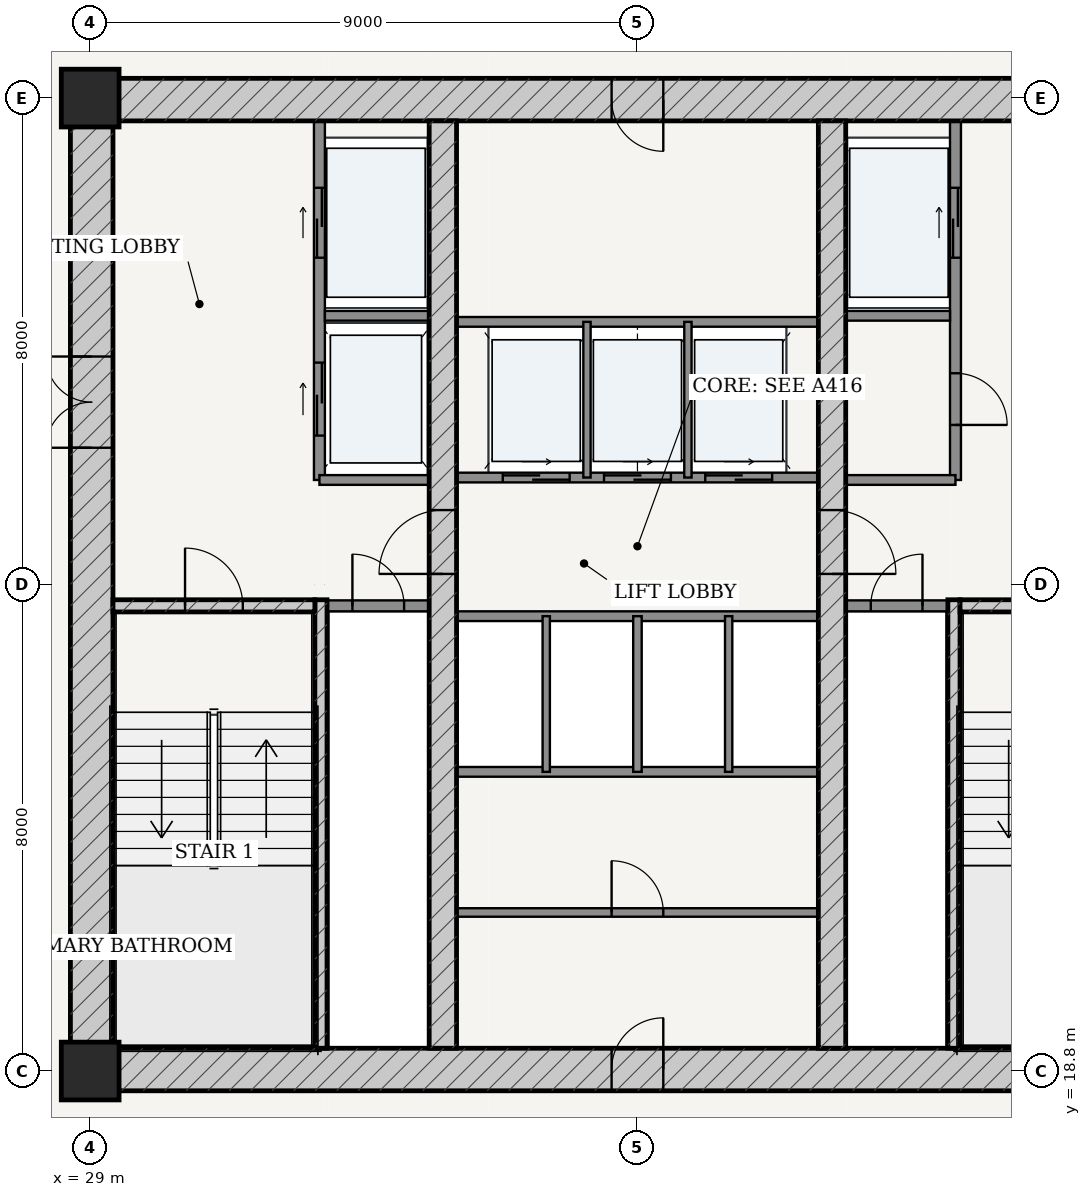
"""IFC4 building model, lengths in metres.
Left out: names, types, materials, properties, quantities, classifications, styles, units other than length and angle.
Written with IfcOpenShell. Run it as: python <this file> out.ifc"""

import sys

from ifc_helpers import new_model, si_unit, direction, frame, frame_2d, origin, origin_2d, place, context, subcontext, project, spatial, rectangle, extrude, source, transform, mapped, element, fill, save


model = new_model("IFC4")
c1 = context("Model", 3, precision=1e-05, world=origin(), true_north=direction((-0.2419218956, 0.970295726276)))
c2 = subcontext(c1, "Body", "Model", "MODEL_VIEW")
j1 = project(units=[si_unit("LENGTHUNIT", "METRE"), si_unit("PLANEANGLEUNIT", "RADIAN")], contexts=[c1])
p1 = place(None, origin())
s1 = spatial("IfcSite", under=j1, at=p1, CompositionType="ELEMENT")
p2 = place(p1, origin())
s2 = spatial("IfcBuilding", under=s1, at=p2, CompositionType="ELEMENT")
p3 = place(p2, frame((0.0, 0.0, 90.6)))
s3 = spatial("IfcBuildingStorey", under=s2, at=p3, CompositionType="ELEMENT", Elevation=90.6)
for number, where, z_axis, x_axis in (
    (1, (29.0, 18.8, 0.0), (0.0, 0.0, 1.0), (1.0, 0.0, 0.0)),
    (2, (29.0, 34.8, 0.0), (0.0, 0.0, 1.0), (1.0, 0.0, 0.0)),
):
    element("IfcColumn", number, at=place(p3, frame(where, z_axis=z_axis, x_axis=x_axis)), inside=s3, PredefinedType="COLUMN", context=c2, shape_type="SweptSolid", body=[
        extrude(rectangle(XDim=0.95, YDim=0.95, at=origin_2d()), origin(), (0.0, 0.0, 1.0), 3.6),
    ])
p4 = place(p3, frame((28.675, 18.825, 0.0), z_axis=(0.0, 0.0, 1.0), x_axis=(1.0, 0.0, 0.0)))
e3 = element("IfcWall", 3, at=p4, inside=s3, PredefinedType="SHEAR", context=c2, shape_type="SweptSolid", body=[
    extrude(rectangle(XDim=18.65, YDim=0.7, at=frame_2d((9.325, 0.0))), origin(), (0.0, 0.0, 1.0), 3.325),
])
p5 = place(p4, frame((8.9, 0.0, 0.0)))
e4 = element("IfcOpeningElement", 4, at=p5, cuts=e3, PredefinedType="OPENING", context=c2, shape_type="SweptSolid", body=[
    extrude(rectangle(XDim=0.85, YDim=2.1, at=frame_2d((0.425, 1.05))), frame((0.0, 0.36, 0.0), z_axis=(0.0, -1.0, 0.0), x_axis=(1.0, 0.0, 0.0)), (0.0, 0.0, 1.0), 0.72),
])
p6 = place(p3, frame((28.675, 34.775, 0.0), z_axis=(0.0, 0.0, 1.0), x_axis=(1.0, 0.0, 0.0)))
e5 = element("IfcWall", 5, at=p6, inside=s3, PredefinedType="SHEAR", context=c2, shape_type="SweptSolid", body=[
    extrude(rectangle(XDim=18.65, YDim=0.7, at=frame_2d((9.325, 0.0))), origin(), (0.0, 0.0, 1.0), 3.325),
])
p7 = place(p6, frame((8.9, 0.0, 0.0)))
e6 = element("IfcOpeningElement", 6, at=p7, cuts=e5, PredefinedType="OPENING", context=c2, shape_type="SweptSolid", body=[
    extrude(rectangle(XDim=0.85, YDim=2.1, at=frame_2d((0.425, 1.05))), frame((0.0, 0.36, 0.0), z_axis=(0.0, -1.0, 0.0), x_axis=(1.0, 0.0, 0.0)), (0.0, 0.0, 1.0), 0.72),
])
p8 = place(p3, frame((29.025, 19.175, 0.0), z_axis=(0.0, 0.0, 1.0), x_axis=(0.0, 1.0, 0.0)))
e7 = element("IfcWall", 7, at=p8, inside=s3, PredefinedType="SHEAR", context=c2, shape_type="SweptSolid", body=[
    extrude(rectangle(XDim=15.25, YDim=0.7, at=frame_2d((7.625, 0.0))), origin(), (0.0, 0.0, 1.0), 3.325),
])
p9 = place(p8, frame((9.875, 0.0, 0.0)))
e8 = element("IfcOpeningElement", 8, at=p9, cuts=e7, PredefinedType="OPENING", context=c2, shape_type="SweptSolid", body=[
    extrude(rectangle(XDim=1.5, YDim=2.2, at=frame_2d((0.75, 1.1))), frame((0.0, 0.36, 0.0), z_axis=(0.0, -1.0, 0.0), x_axis=(1.0, 0.0, 0.0)), (0.0, 0.0, 1.0), 0.72),
])
p10 = place(p3, frame((32.795, 19.175, 0.0), z_axis=(0.0, 0.0, 1.0), x_axis=(0.0, 1.0, 0.0)))
e9 = element("IfcWall", 9, at=p10, inside=s3, PredefinedType="SOLIDWALL", context=c2, shape_type="SweptSolid", body=[
    extrude(rectangle(XDim=7.375, YDim=0.2, at=frame_2d((3.688, 0.0))), origin(), (0.0, 0.0, 1.0), 3.325),
])
p11 = place(p3, frame((29.375, 26.45, 0.0), z_axis=(0.0, 0.0, 1.0), x_axis=(1.0, 0.0, 0.0)))
e10 = element("IfcWall", 10, at=p11, inside=s3, PredefinedType="SOLIDWALL", context=c2, shape_type="SweptSolid", body=[
    extrude(rectangle(XDim=3.32, YDim=0.2, at=frame_2d((1.66, 0.0))), origin(), (0.0, 0.0, 1.0), 3.325),
])
p12 = place(p11, frame((1.185, 0.0, 0.0)))
e11 = element("IfcOpeningElement", 11, at=p12, cuts=e10, PredefinedType="OPENING", context=c2, shape_type="SweptSolid", body=[
    extrude(rectangle(XDim=0.95, YDim=2.15, at=frame_2d((0.475, 1.075))), frame((0.0, 0.11, 0.0), z_axis=(0.0, -1.0, 0.0), x_axis=(1.0, 0.0, 0.0)), (0.0, 0.0, 1.0), 0.22),
])
p13 = place(p3, frame((43.205, 19.175, 0.0), z_axis=(0.0, 0.0, 1.0), x_axis=(0.0, 1.0, 0.0)))
e12 = element("IfcWall", 12, at=p13, inside=s3, PredefinedType="SOLIDWALL", context=c2, shape_type="SweptSolid", body=[
    extrude(rectangle(XDim=7.375, YDim=0.2, at=frame_2d((3.688, 0.0))), origin(), (0.0, 0.0, 1.0), 3.325),
])
p14 = place(p3, frame((43.305, 26.45, 0.0), z_axis=(0.0, 0.0, 1.0), x_axis=(1.0, 0.0, 0.0)))
e13 = element("IfcWall", 13, at=p14, inside=s3, PredefinedType="SOLIDWALL", context=c2, shape_type="SweptSolid", body=[
    extrude(rectangle(XDim=3.32, YDim=0.2, at=frame_2d((1.66, 0.0))), origin(), (0.0, 0.0, 1.0), 3.325),
])
p15 = place(p14, frame((1.185, 0.0, 0.0)))
e14 = element("IfcOpeningElement", 14, at=p15, cuts=e13, PredefinedType="OPENING", context=c2, shape_type="SweptSolid", body=[
    extrude(rectangle(XDim=0.95, YDim=2.15, at=frame_2d((0.475, 1.075))), frame((0.0, 0.11, 0.0), z_axis=(0.0, -1.0, 0.0), x_axis=(1.0, 0.0, 0.0)), (0.0, 0.0, 1.0), 0.22),
])
p16 = place(p3, frame((34.8, 19.175, 0.0), z_axis=(0.0, 0.0, 1.0), x_axis=(0.0, 1.0, 0.0)))
e15 = element("IfcWall", 15, at=p16, inside=s3, PredefinedType="SHEAR", context=c2, shape_type="SweptSolid", body=[
    extrude(rectangle(XDim=15.25, YDim=0.45, at=frame_2d((7.625, 0.0))), origin(), (0.0, 0.0, 1.0), 3.325),
])
p17 = place(p16, frame((7.8, 0.0, 0.0)))
e16 = element("IfcOpeningElement", 16, at=p17, cuts=e15, PredefinedType="OPENING", context=c2, shape_type="SweptSolid", body=[
    extrude(rectangle(XDim=1.05, YDim=2.15, at=frame_2d((0.525, 1.075))), frame((0.0, 0.235, 0.0), z_axis=(0.0, -1.0, 0.0), x_axis=(1.0, 0.0, 0.0)), (0.0, 0.0, 1.0), 0.47),
])
p18 = place(p3, frame((41.2, 19.175, 0.0), z_axis=(0.0, 0.0, 1.0), x_axis=(0.0, 1.0, 0.0)))
e17 = element("IfcWall", 17, at=p18, inside=s3, PredefinedType="SHEAR", context=c2, shape_type="SweptSolid", body=[
    extrude(rectangle(XDim=15.25, YDim=0.45, at=frame_2d((7.625, 0.0))), origin(), (0.0, 0.0, 1.0), 3.325),
])
p19 = place(p18, frame((7.8, 0.0, 0.0)))
e18 = element("IfcOpeningElement", 18, at=p19, cuts=e17, PredefinedType="OPENING", context=c2, shape_type="SweptSolid", body=[
    extrude(rectangle(XDim=1.05, YDim=2.15, at=frame_2d((0.525, 1.075))), frame((0.0, 0.235, 0.0), z_axis=(0.0, -1.0, 0.0), x_axis=(1.0, 0.0, 0.0)), (0.0, 0.0, 1.0), 0.47),
])
p20 = place(p3, frame((32.9, 26.45, 0.0), z_axis=(0.0, 0.0, 1.0), x_axis=(1.0, 0.0, 0.0)))
e19 = element("IfcWall", 19, at=p20, inside=s3, PredefinedType="PARTITIONING", context=c2, shape_type="SweptSolid", body=[
    extrude(rectangle(XDim=1.675, YDim=0.18, at=frame_2d((0.837, 0.0))), origin(), (0.0, 0.0, 1.0), 3.325),
])
p21 = place(p20, frame((0.413, 0.0, 0.0)))
e20 = element("IfcOpeningElement", 20, at=p21, cuts=e19, PredefinedType="OPENING", context=c2, shape_type="SweptSolid", body=[
    extrude(rectangle(XDim=0.85, YDim=2.1, at=frame_2d((0.425, 1.05))), frame((0.0, 0.1, 0.0), z_axis=(0.0, -1.0, 0.0), x_axis=(1.0, 0.0, 0.0)), (0.0, 0.0, 1.0), 0.2),
])
p22 = place(p3, frame((41.425, 26.45, 0.0), z_axis=(0.0, 0.0, 1.0), x_axis=(1.0, 0.0, 0.0)))
e21 = element("IfcWall", 21, at=p22, inside=s3, PredefinedType="PARTITIONING", context=c2, shape_type="SweptSolid", body=[
    extrude(rectangle(XDim=1.675, YDim=0.18, at=frame_2d((0.837, 0.0))), origin(), (0.0, 0.0, 1.0), 3.325),
])
p23 = place(p22, frame((0.413, 0.0, 0.0)))
e22 = element("IfcOpeningElement", 22, at=p23, cuts=e21, PredefinedType="OPENING", context=c2, shape_type="SweptSolid", body=[
    extrude(rectangle(XDim=0.85, YDim=2.1, at=frame_2d((0.425, 1.05))), frame((0.0, 0.1, 0.0), z_axis=(0.0, -1.0, 0.0), x_axis=(1.0, 0.0, 0.0)), (0.0, 0.0, 1.0), 0.2),
])
p24 = place(p3, frame((32.77, 28.52, 0.0), z_axis=(0.0, 0.0, 1.0), x_axis=(0.0, 1.0, 0.0)))
e23 = element("IfcWall", 23, at=p24, inside=s3, PredefinedType="PARTITIONING", context=c2, shape_type="SweptSolid", body=[
    extrude(rectangle(XDim=5.905, YDim=0.18, at=frame_2d((2.953, 0.0))), origin(), (0.0, 0.0, 1.0), 3.325),
])
p25 = place(p24, frame((3.655, 0.0, 0.0)))
e24 = element("IfcOpeningElement", 24, at=p25, cuts=e23, PredefinedType="OPENING", context=c2, shape_type="SweptSolid", body=[
    extrude(rectangle(XDim=1.15, YDim=2.2, at=frame_2d((0.575, 1.1))), frame((0.0, 0.1, 0.0), z_axis=(0.0, -1.0, 0.0), x_axis=(1.0, 0.0, 0.0)), (0.0, 0.0, 1.0), 0.2),
])
p26 = place(p24, frame((0.73, 0.0, 0.0)))
e25 = element("IfcOpeningElement", 25, at=p26, cuts=e23, PredefinedType="OPENING", context=c2, shape_type="SweptSolid", body=[
    extrude(rectangle(XDim=1.2, YDim=2.25, at=frame_2d((0.6, 1.125))), frame((0.0, 0.1, 0.0), z_axis=(0.0, -1.0, 0.0), x_axis=(1.0, 0.0, 0.0)), (0.0, 0.0, 1.0), 0.2),
])
p27 = place(p3, frame((32.86, 31.22, 0.0), z_axis=(0.0, 0.0, 1.0), x_axis=(1.0, 0.0, 0.0)))
e26 = element("IfcWall", 26, at=p27, inside=s3, PredefinedType="PARTITIONING", context=c2, shape_type="SweptSolid", body=[
    extrude(rectangle(XDim=1.715, YDim=0.16, at=frame_2d((0.857, 0.0))), origin(), (0.0, 0.0, 1.0), 3.325),
])
p28 = place(p3, frame((32.77, 28.52, 0.0), z_axis=(0.0, 0.0, 1.0), x_axis=(1.0, 0.0, 0.0)))
e27 = element("IfcWall", 27, at=p28, inside=s3, PredefinedType="PARTITIONING", context=c2, shape_type="SweptSolid", body=[
    extrude(rectangle(XDim=1.805, YDim=0.16, at=frame_2d((0.902, 0.0))), origin(), (0.0, 0.0, 1.0), 3.325),
])
p29 = place(p3, frame((43.23, 28.52, 0.0), z_axis=(0.0, 0.0, 1.0), x_axis=(0.0, 1.0, 0.0)))
e28 = element("IfcWall", 28, at=p29, inside=s3, PredefinedType="PARTITIONING", context=c2, shape_type="SweptSolid", body=[
    extrude(rectangle(XDim=5.905, YDim=0.18, at=frame_2d((2.953, 0.0))), origin(), (0.0, 0.0, 1.0), 3.325),
])
p30 = place(p29, frame((0.905, 0.0, 0.0)))
e29 = element("IfcOpeningElement", 29, at=p30, cuts=e28, PredefinedType="OPENING", context=c2, shape_type="SweptSolid", body=[
    extrude(rectangle(XDim=0.85, YDim=2.1, at=frame_2d((0.425, 1.05))), frame((0.0, 0.1, 0.0), z_axis=(0.0, -1.0, 0.0), x_axis=(1.0, 0.0, 0.0)), (0.0, 0.0, 1.0), 0.2),
])
p31 = place(p29, frame((3.655, 0.0, 0.0)))
e30 = element("IfcOpeningElement", 30, at=p31, cuts=e28, PredefinedType="OPENING", context=c2, shape_type="SweptSolid", body=[
    extrude(rectangle(XDim=1.15, YDim=2.2, at=frame_2d((0.575, 1.1))), frame((0.0, 0.1, 0.0), z_axis=(0.0, -1.0, 0.0), x_axis=(1.0, 0.0, 0.0)), (0.0, 0.0, 1.0), 0.2),
])
p32 = place(p3, frame((41.425, 31.22, 0.0), z_axis=(0.0, 0.0, 1.0), x_axis=(1.0, 0.0, 0.0)))
e31 = element("IfcWall", 31, at=p32, inside=s3, PredefinedType="PARTITIONING", context=c2, shape_type="SweptSolid", body=[
    extrude(rectangle(XDim=1.715, YDim=0.16, at=frame_2d((0.857, 0.0))), origin(), (0.0, 0.0, 1.0), 3.325),
])
p33 = place(p3, frame((41.425, 28.52, 0.0), z_axis=(0.0, 0.0, 1.0), x_axis=(1.0, 0.0, 0.0)))
e32 = element("IfcWall", 32, at=p33, inside=s3, PredefinedType="PARTITIONING", context=c2, shape_type="SweptSolid", body=[
    extrude(rectangle(XDim=1.805, YDim=0.16, at=frame_2d((0.902, 0.0))), origin(), (0.0, 0.0, 1.0), 3.325),
])
p34 = place(p3, frame((35.025, 28.56, 0.0), z_axis=(0.0, 0.0, 1.0), x_axis=(1.0, 0.0, 0.0)))
e33 = element("IfcWall", 33, at=p34, inside=s3, PredefinedType="PARTITIONING", context=c2, shape_type="SweptSolid", body=[
    extrude(rectangle(XDim=5.95, YDim=0.16, at=frame_2d((2.975, 0.0))), origin(), (0.0, 0.0, 1.0), 3.325),
])
p35 = place(p34, frame((0.76, 0.0, 0.0)))
e34 = element("IfcOpeningElement", 34, at=p35, cuts=e33, PredefinedType="OPENING", context=c2, shape_type="SweptSolid", body=[
    extrude(rectangle(XDim=1.1, YDim=2.2, at=frame_2d((0.55, 1.1))), frame((0.0, 0.09, 0.0), z_axis=(0.0, -1.0, 0.0), x_axis=(1.0, 0.0, 0.0)), (0.0, 0.0, 1.0), 0.18),
])
p36 = place(p34, frame((2.425, 0.0, 0.0)))
e35 = element("IfcOpeningElement", 35, at=p36, cuts=e33, PredefinedType="OPENING", context=c2, shape_type="SweptSolid", body=[
    extrude(rectangle(XDim=1.1, YDim=2.2, at=frame_2d((0.55, 1.1))), frame((0.0, 0.09, 0.0), z_axis=(0.0, -1.0, 0.0), x_axis=(1.0, 0.0, 0.0)), (0.0, 0.0, 1.0), 0.18),
])
p37 = place(p34, frame((4.09, 0.0, 0.0)))
e36 = element("IfcOpeningElement", 36, at=p37, cuts=e33, PredefinedType="OPENING", context=c2, shape_type="SweptSolid", body=[
    extrude(rectangle(XDim=1.1, YDim=2.2, at=frame_2d((0.55, 1.1))), frame((0.0, 0.09, 0.0), z_axis=(0.0, -1.0, 0.0), x_axis=(1.0, 0.0, 0.0)), (0.0, 0.0, 1.0), 0.18),
])
p38 = place(p3, frame((35.025, 31.12, 0.0), z_axis=(0.0, 0.0, 1.0), x_axis=(1.0, 0.0, 0.0)))
e37 = element("IfcWall", 37, at=p38, inside=s3, PredefinedType="PARTITIONING", context=c2, shape_type="SweptSolid", body=[
    extrude(rectangle(XDim=5.95, YDim=0.16, at=frame_2d((2.975, 0.0))), origin(), (0.0, 0.0, 1.0), 3.325),
])
for number, where, z_axis, x_axis in (
    (38, (37.17, 28.56, 0.0), (0.0, 0.0, 1.0), (0.0, 1.0, 0.0)),
    (39, (38.83, 28.56, 0.0), (0.0, 0.0, 1.0), (0.0, 1.0, 0.0)),
):
    element("IfcWall", number, at=place(p3, frame(where, z_axis=z_axis, x_axis=x_axis)), inside=s3, PredefinedType="PARTITIONING", context=c2, shape_type="SweptSolid", body=[
        extrude(rectangle(XDim=2.56, YDim=0.12, at=frame_2d((1.28, 0.0))), origin(), (0.0, 0.0, 1.0), 3.325),
    ])
for number, where, z_axis, x_axis in (
    (40, (35.025, 26.28, 0.0), (0.0, 0.0, 1.0), (1.0, 0.0, 0.0)),
    (41, (35.025, 23.72, 0.0), (0.0, 0.0, 1.0), (1.0, 0.0, 0.0)),
):
    element("IfcWall", number, at=place(p3, frame(where, z_axis=z_axis, x_axis=x_axis)), inside=s3, PredefinedType="PARTITIONING", context=c2, shape_type="SweptSolid", body=[
        extrude(rectangle(XDim=5.95, YDim=0.16, at=frame_2d((2.975, 0.0))), origin(), (0.0, 0.0, 1.0), 3.325),
    ])
p39 = place(p3, frame((36.5, 23.72, 0.0), z_axis=(0.0, 0.0, 1.0), x_axis=(0.0, 1.0, 0.0)))
e42 = element("IfcWall", 42, at=p39, inside=s3, PredefinedType="PARTITIONING", context=c2, shape_type="SweptSolid", body=[
    extrude(rectangle(XDim=2.56, YDim=0.12, at=frame_2d((1.28, 0.0))), origin(), (0.0, 0.0, 1.0), 3.325),
])
p40 = place(p3, frame((38.0, 23.72, 0.0), z_axis=(0.0, 0.0, 1.0), x_axis=(0.0, 1.0, 0.0)))
e43 = element("IfcWall", 43, at=p40, inside=s3, PredefinedType="PARTITIONING", context=c2, shape_type="SweptSolid", body=[
    extrude(rectangle(XDim=2.56, YDim=0.14, at=frame_2d((1.28, 0.0))), origin(), (0.0, 0.0, 1.0), 3.325),
])
p41 = place(p3, frame((39.5, 23.72, 0.0), z_axis=(0.0, 0.0, 1.0), x_axis=(0.0, 1.0, 0.0)))
e44 = element("IfcWall", 44, at=p41, inside=s3, PredefinedType="PARTITIONING", context=c2, shape_type="SweptSolid", body=[
    extrude(rectangle(XDim=2.56, YDim=0.12, at=frame_2d((1.28, 0.0))), origin(), (0.0, 0.0, 1.0), 3.325),
])
p42 = place(p3, frame((35.025, 21.407, 0.0), z_axis=(0.0, 0.0, 1.0), x_axis=(1.0, 0.0, 0.0)))
e45 = element("IfcWall", 45, at=p42, inside=s3, PredefinedType="PARTITIONING", context=c2, shape_type="SweptSolid", body=[
    extrude(rectangle(XDim=5.95, YDim=0.14, at=frame_2d((2.975, 0.0))), origin(), (0.0, 0.0, 1.0), 3.325),
])
p43 = place(p42, frame((2.55, 0.0, 0.0)))
e46 = element("IfcOpeningElement", 46, at=p43, cuts=e45, PredefinedType="OPENING", context=c2, shape_type="SweptSolid", body=[
    extrude(rectangle(XDim=0.85, YDim=2.1, at=frame_2d((0.425, 1.05))), frame((0.0, 0.08, 0.0), z_axis=(0.0, -1.0, 0.0), x_axis=(1.0, 0.0, 0.0)), (0.0, 0.0, 1.0), 0.16),
])
m1 = source(origin(), c2, "Body", "SweptSolid", [
    extrude(rectangle(XDim=1.5, YDim=2.2, at=frame_2d((0.75, 1.1))), frame((0.0, 0.025, 0.0), z_axis=(0.0, -1.0, 0.0), x_axis=(1.0, 0.0, 0.0)), (0.0, 0.0, 1.0), 0.05),
])
p44 = place(p9, origin())
e47 = element("IfcDoor", 47, at=p44, inside=s3, OperationType="DOUBLE_DOOR_SINGLE_SWING", PredefinedType="DOOR", context=c2, shape_type="MappedRepresentation", body=[
    mapped(m1, transform((0.0, 0.0, 0.0), scale=1.0)),
])
fill(e8, e47)
m2 = source(origin(), c2, "Body", "SweptSolid", [
    extrude(rectangle(XDim=1.05, YDim=2.15, at=frame_2d((0.525, 1.075))), frame((0.0, 0.025, 0.0), z_axis=(0.0, -1.0, 0.0), x_axis=(1.0, 0.0, 0.0)), (0.0, 0.0, 1.0), 0.05),
])
p45 = place(p17, origin())
e48 = element("IfcDoor", 48, at=p45, inside=s3, OperationType="SINGLE_SWING_LEFT", PredefinedType="DOOR", context=c2, shape_type="MappedRepresentation", body=[
    mapped(m2, transform((0.0, 0.0, 0.0), scale=1.0)),
])
fill(e16, e48)
p46 = place(p19, frame((1.05, 0.0, 0.0), z_axis=(0.0, 0.0, 1.0), x_axis=(-1.0, 0.0, 0.0)))
e49 = element("IfcDoor", 49, at=p46, inside=s3, OperationType="SINGLE_SWING_RIGHT", PredefinedType="DOOR", context=c2, shape_type="MappedRepresentation", body=[
    mapped(m2, transform((0.0, 0.0, 0.0), scale=1.0)),
])
fill(e18, e49)
m3 = source(origin(), c2, "Body", "SweptSolid", [
    extrude(rectangle(XDim=0.95, YDim=2.15, at=frame_2d((0.475, 1.075))), frame((0.0, 0.025, 0.0), z_axis=(0.0, -1.0, 0.0), x_axis=(1.0, 0.0, 0.0)), (0.0, 0.0, 1.0), 0.05),
])
p47 = place(p12, origin())
e50 = element("IfcDoor", 50, at=p47, inside=s3, OperationType="SINGLE_SWING_LEFT", PredefinedType="DOOR", context=c2, shape_type="MappedRepresentation", body=[
    mapped(m3, transform((0.0, 0.0, 0.0), scale=1.0)),
])
fill(e11, e50)
m4 = source(origin(), c2, "Body", "SweptSolid", [
    extrude(rectangle(XDim=0.85, YDim=2.1, at=frame_2d((0.425, 1.05))), frame((0.0, 0.025, 0.0), z_axis=(0.0, -1.0, 0.0), x_axis=(1.0, 0.0, 0.0)), (0.0, 0.0, 1.0), 0.05),
])
p48 = place(p21, origin())
e51 = element("IfcDoor", 51, at=p48, inside=s3, OperationType="SINGLE_SWING_LEFT", PredefinedType="DOOR", context=c2, shape_type="MappedRepresentation", body=[
    mapped(m4, transform((0.0, 0.0, 0.0), scale=1.0)),
])
fill(e20, e51)
p49 = place(p23, origin())
e52 = element("IfcDoor", 52, at=p49, inside=s3, OperationType="SINGLE_SWING_RIGHT", PredefinedType="DOOR", context=c2, shape_type="MappedRepresentation", body=[
    mapped(m4, transform((0.0, 0.0, 0.0), scale=1.0)),
])
fill(e22, e52)
p50 = place(p30, frame((0.85, 0.0, 0.0), z_axis=(0.0, 0.0, 1.0), x_axis=(-1.0, 0.0, 0.0)))
e53 = element("IfcDoor", 53, at=p50, inside=s3, OperationType="SINGLE_SWING_RIGHT", PredefinedType="DOOR", context=c2, shape_type="MappedRepresentation", body=[
    mapped(m4, transform((0.0, 0.0, 0.0), scale=1.0)),
])
fill(e29, e53)
p51 = place(p7, frame((0.85, 0.0, 0.0), z_axis=(0.0, 0.0, 1.0), x_axis=(-1.0, 0.0, 0.0)))
e54 = element("IfcDoor", 54, at=p51, inside=s3, OperationType="SINGLE_SWING_LEFT", PredefinedType="DOOR", context=c2, shape_type="MappedRepresentation", body=[
    mapped(m4, transform((0.0, 0.0, 0.0), scale=1.0)),
])
fill(e6, e54)
p52 = place(p5, origin())
e55 = element("IfcDoor", 55, at=p52, inside=s3, OperationType="SINGLE_SWING_RIGHT", PredefinedType="DOOR", context=c2, shape_type="MappedRepresentation", body=[
    mapped(m4, transform((0.0, 0.0, 0.0), scale=1.0)),
])
fill(e4, e55)
p53 = place(p43, origin())
e56 = element("IfcDoor", 56, at=p53, inside=s3, OperationType="SINGLE_SWING_LEFT", PredefinedType="DOOR", context=c2, shape_type="MappedRepresentation", body=[
    mapped(m4, transform((0.0, 0.0, 0.0), scale=1.0)),
])
fill(e46, e56)
m5 = source(origin(), c2, "Body", "SweptSolid", [
    extrude(rectangle(XDim=1.15, YDim=2.2, at=frame_2d((0.575, 1.1))), frame((0.0, 0.025, 0.0), z_axis=(0.0, -1.0, 0.0), x_axis=(1.0, 0.0, 0.0)), (0.0, 0.0, 1.0), 0.05),
])
p54 = place(p25, origin())
e57 = element("IfcDoor", 57, at=p54, inside=s3, OperationType="DOUBLE_DOOR_SLIDING", PredefinedType="DOOR", context=c2, shape_type="MappedRepresentation", body=[
    mapped(m5, transform((0.0, 0.0, 0.0), scale=1.0)),
])
fill(e24, e57)
p55 = place(p31, origin())
e58 = element("IfcDoor", 58, at=p55, inside=s3, OperationType="DOUBLE_DOOR_SLIDING", PredefinedType="DOOR", context=c2, shape_type="MappedRepresentation", body=[
    mapped(m5, transform((0.0, 0.0, 0.0), scale=1.0)),
])
fill(e30, e58)
m6 = source(origin(), c2, "Body", "SweptSolid", [
    extrude(rectangle(XDim=1.2, YDim=2.25, at=frame_2d((0.6, 1.125))), frame((0.0, 0.025, 0.0), z_axis=(0.0, -1.0, 0.0), x_axis=(1.0, 0.0, 0.0)), (0.0, 0.0, 1.0), 0.05),
])
p56 = place(p26, origin())
e59 = element("IfcDoor", 59, at=p56, inside=s3, OperationType="DOUBLE_DOOR_SLIDING", PredefinedType="DOOR", context=c2, shape_type="MappedRepresentation", body=[
    mapped(m6, transform((0.0, 0.0, 0.0), scale=1.0)),
])
fill(e25, e59)
m7 = source(origin(), c2, "Body", "SweptSolid", [
    extrude(rectangle(XDim=1.1, YDim=2.2, at=frame_2d((0.55, 1.1))), frame((0.0, 0.025, 0.0), z_axis=(0.0, -1.0, 0.0), x_axis=(1.0, 0.0, 0.0)), (0.0, 0.0, 1.0), 0.05),
])
p57 = place(p35, origin())
e60 = element("IfcDoor", 60, at=p57, inside=s3, OperationType="DOUBLE_DOOR_SLIDING", PredefinedType="DOOR", context=c2, shape_type="MappedRepresentation", body=[
    mapped(m7, transform((0.0, 0.0, 0.0), scale=1.0)),
])
fill(e34, e60)
p58 = place(p36, origin())
e61 = element("IfcDoor", 61, at=p58, inside=s3, OperationType="DOUBLE_DOOR_SLIDING", PredefinedType="DOOR", context=c2, shape_type="MappedRepresentation", body=[
    mapped(m7, transform((0.0, 0.0, 0.0), scale=1.0)),
])
fill(e35, e61)
p59 = place(p37, origin())
e62 = element("IfcDoor", 62, at=p59, inside=s3, OperationType="DOUBLE_DOOR_SLIDING", PredefinedType="DOOR", context=c2, shape_type="MappedRepresentation", body=[
    mapped(m7, transform((0.0, 0.0, 0.0), scale=1.0)),
])
fill(e36, e62)
save(model, sys.argv[1])
